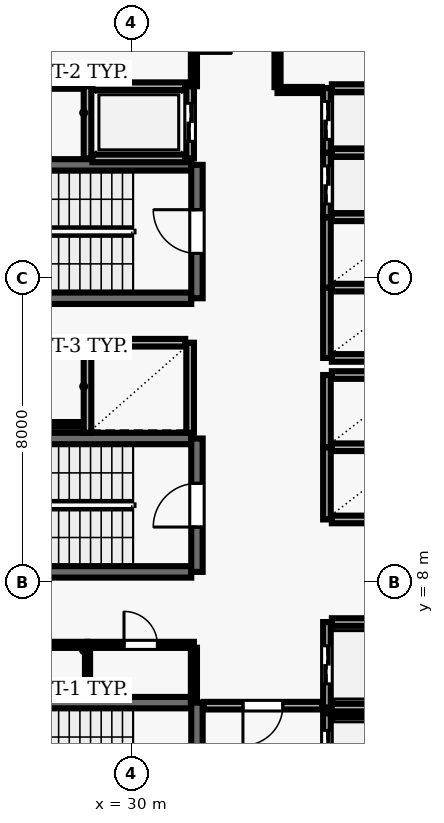
"""IFC4 building model, lengths in metres.
Left out: names, types, materials, properties, quantities, classifications, styles, units other than length and angle.
Written with IfcOpenShell. Run it as: python <this file> out.ifc"""

import sys

from ifc_helpers import new_model, si_unit, direction, frame, frame_2d, origin, place, context, subcontext, project, spatial, rectangle, extrude, element, fill, save


model = new_model("IFC4")
c1 = context("Model", 3, precision=1e-05, world=origin(), true_north=direction((0.0, 1.0)))
c2 = subcontext(c1, "Body", "Model", "MODEL_VIEW")
j1 = project(units=[si_unit("LENGTHUNIT", "METRE"), si_unit("PLANEANGLEUNIT", "RADIAN")], contexts=[c1])
p1 = place(None, origin())
s1 = spatial("IfcSite", under=j1, at=p1, CompositionType="ELEMENT")
p2 = place(p1, origin())
s2 = spatial("IfcBuilding", under=s1, at=p2, CompositionType="ELEMENT")
p3 = place(p2, frame((0.0, 0.0, 115.1)))
s3 = spatial("IfcBuildingStorey", under=s2, at=p3, CompositionType="ELEMENT", Elevation=115.1)
p4 = place(p3, frame((31.58, 4.83, 0.0), z_axis=(0.0, 0.0, 1.0), x_axis=(-1.0, 0.0, 0.0)))
e1 = element("IfcWall", 1, at=p4, inside=s3, PredefinedType="SHEAR", context=c2, shape_type="SweptSolid", body=[
    extrude(rectangle(XDim=8.36, YDim=0.3, at=frame_2d((4.18, 0.0))), origin(), (0.0, 0.0, 1.0), 3.69),
])
p5 = place(p3, frame((31.73, 0.96, 0.0), z_axis=(0.0, 0.0, 1.0), x_axis=(0.0, 1.0, 0.0)))
e2 = element("IfcWall", 2, at=p5, inside=s3, PredefinedType="SHEAR", context=c2, shape_type="SweptSolid", body=[
    extrude(rectangle(XDim=3.87, YDim=0.3, at=frame_2d((1.935, 0.0))), origin(), (0.0, 0.0, 1.0), 3.69),
])
p6 = place(p5, frame((1.54, 0.0, 0.0)))
e3 = element("IfcOpeningElement", 3, at=p6, cuts=e2, PredefinedType="OPENING", context=c2, shape_type="SweptSolid", body=[
    extrude(rectangle(XDim=1.15, YDim=2.15, at=frame_2d((0.575, 1.075))), frame((0.0, 0.16, 0.0), z_axis=(0.0, -1.0, 0.0), x_axis=(1.0, 0.0, 0.0)), (0.0, 0.0, 1.0), 0.32),
])
for number, where, z_axis, x_axis in (
    (4, (31.58, 18.98, 0.0), (0.0, 0.0, 1.0), (-1.0, 0.0, 0.0)),
    (5, (23.22, 15.47, 0.0), (0.0, 0.0, 1.0), (1.0, 0.0, 0.0)),
):
    element("IfcWall", number, at=place(p3, frame(where, z_axis=z_axis, x_axis=x_axis)), inside=s3, PredefinedType="SHEAR", context=c2, shape_type="SweptSolid", body=[
        extrude(rectangle(XDim=8.36, YDim=0.3, at=frame_2d((4.18, 0.0))), origin(), (0.0, 0.0, 1.0), 3.69),
    ])
p7 = place(p3, frame((31.73, 15.47, 0.0), z_axis=(0.0, 0.0, 1.0), x_axis=(0.0, 1.0, 0.0)))
e6 = element("IfcWall", 6, at=p7, inside=s3, PredefinedType="SHEAR", context=c2, shape_type="SweptSolid", body=[
    extrude(rectangle(XDim=3.51, YDim=0.3, at=frame_2d((1.755, 0.0))), origin(), (0.0, 0.0, 1.0), 3.69),
])
p8 = place(p7, frame((1.18, 0.0, 0.0)))
e7 = element("IfcOpeningElement", 7, at=p8, cuts=e6, PredefinedType="OPENING", context=c2, shape_type="SweptSolid", body=[
    extrude(rectangle(XDim=1.15, YDim=2.15, at=frame_2d((0.575, 1.075))), frame((0.0, 0.16, 0.0), z_axis=(0.0, -1.0, 0.0), x_axis=(1.0, 0.0, 0.0)), (0.0, 0.0, 1.0), 0.32),
])
for number, where, z_axis, x_axis in (
    (8, (31.58, 11.78, 0.0), (0.0, 0.0, 1.0), (-1.0, 0.0, 0.0)),
    (9, (23.22, 8.27, 0.0), (0.0, 0.0, 1.0), (1.0, 0.0, 0.0)),
):
    element("IfcWall", number, at=place(p3, frame(where, z_axis=z_axis, x_axis=x_axis)), inside=s3, PredefinedType="SHEAR", context=c2, shape_type="SweptSolid", body=[
        extrude(rectangle(XDim=8.36, YDim=0.3, at=frame_2d((4.18, 0.0))), origin(), (0.0, 0.0, 1.0), 3.69),
    ])
p9 = place(p3, frame((31.73, 8.27, 0.0), z_axis=(0.0, 0.0, 1.0), x_axis=(0.0, 1.0, 0.0)))
e10 = element("IfcWall", 10, at=p9, inside=s3, PredefinedType="SHEAR", context=c2, shape_type="SweptSolid", body=[
    extrude(rectangle(XDim=3.51, YDim=0.3, at=frame_2d((1.755, 0.0))), origin(), (0.0, 0.0, 1.0), 3.69),
])
p10 = place(p9, frame((1.18, 0.0, 0.0)))
e11 = element("IfcOpeningElement", 11, at=p10, cuts=e10, PredefinedType="OPENING", context=c2, shape_type="SweptSolid", body=[
    extrude(rectangle(XDim=1.15, YDim=2.15, at=frame_2d((0.575, 1.075))), frame((0.0, 0.16, 0.0), z_axis=(0.0, -1.0, 0.0), x_axis=(1.0, 0.0, 0.0)), (0.0, 0.0, 1.0), 0.32),
])
p11 = place(p3, frame((35.15, 4.55, 0.0), z_axis=(0.0, 0.0, 1.0), x_axis=(0.0, -1.0, 0.0)))
e12 = element("IfcWall", 12, at=p11, inside=s3, PredefinedType="SOLIDWALL", context=c2, shape_type="SweptSolid", body=[
    extrude(rectangle(XDim=2.1, YDim=0.2, at=frame_2d((1.05, 0.0))), origin(), (0.0, 0.0, 1.0), 3.69),
])
p12 = place(p11, frame((0.45, 0.0, 0.0)))
e13 = element("IfcOpeningElement", 13, at=p12, cuts=e12, PredefinedType="OPENING", context=c2, shape_type="SweptSolid", body=[
    extrude(rectangle(XDim=1.2, YDim=2.15, at=frame_2d((0.6, 1.075))), frame((0.0, 0.11, 0.0), z_axis=(0.0, -1.0, 0.0), x_axis=(1.0, 0.0, 0.0)), (0.0, 0.0, 1.0), 0.22),
])
p13 = place(p3, frame((37.42, 4.55, 0.0), z_axis=(0.0, 0.0, 1.0), x_axis=(-1.0, 0.0, 0.0)))
e14 = element("IfcWall", 14, at=p13, inside=s3, PredefinedType="SOLIDWALL", context=c2, shape_type="SweptSolid", body=[
    extrude(rectangle(XDim=2.14, YDim=0.2, at=frame_2d((1.07, 0.0))), origin(), (0.0, 0.0, 1.0), 3.69),
])
p14 = place(p3, frame((35.15, 6.95, 0.0), z_axis=(0.0, 0.0, 1.0), x_axis=(0.0, -1.0, 0.0)))
e15 = element("IfcWall", 15, at=p14, inside=s3, PredefinedType="SOLIDWALL", context=c2, shape_type="SweptSolid", body=[
    extrude(rectangle(XDim=2.25, YDim=0.2, at=frame_2d((1.125, 0.0))), origin(), (0.0, 0.0, 1.0), 3.69),
])
p15 = place(p14, frame((0.625, 0.0, 0.0)))
e16 = element("IfcOpeningElement", 16, at=p15, cuts=e15, PredefinedType="OPENING", context=c2, shape_type="SweptSolid", body=[
    extrude(rectangle(XDim=1.0, YDim=2.1, at=frame_2d((0.5, 1.05))), frame((0.0, 0.11, 0.0), z_axis=(0.0, -1.0, 0.0), x_axis=(1.0, 0.0, 0.0)), (0.0, 0.0, 1.0), 0.22),
])
for number, where, z_axis, x_axis in (
    (17, (35.28, 4.7, 0.0), (0.0, 0.0, 1.0), (1.0, 0.0, 0.0)),
    (18, (37.42, 6.95, 0.0), (0.0, 0.0, 1.0), (-1.0, 0.0, 0.0)),
):
    element("IfcWall", number, at=place(p3, frame(where, z_axis=z_axis, x_axis=x_axis)), inside=s3, PredefinedType="SOLIDWALL", context=c2, shape_type="SweptSolid", body=[
        extrude(rectangle(XDim=2.14, YDim=0.2, at=frame_2d((1.07, 0.0))), origin(), (0.0, 0.0, 1.0), 3.69),
    ])
p16 = place(p3, frame((35.15, 11.55, 0.0), z_axis=(0.0, 0.0, 1.0), x_axis=(0.0, -1.0, 0.0)))
e19 = element("IfcWall", 19, at=p16, inside=s3, PredefinedType="SOLIDWALL", context=c2, shape_type="SweptSolid", body=[
    extrude(rectangle(XDim=1.9, YDim=0.2, at=frame_2d((0.95, 0.0))), origin(), (0.0, 0.0, 1.0), 3.69),
])
for number, where, z_axis, x_axis in (
    (20, (35.28, 9.65, 0.0), (0.0, 0.0, 1.0), (1.0, 0.0, 0.0)),
    (21, (37.42, 11.55, 0.0), (0.0, 0.0, 1.0), (-1.0, 0.0, 0.0)),
):
    element("IfcWall", number, at=place(p3, frame(where, z_axis=z_axis, x_axis=x_axis)), inside=s3, PredefinedType="SOLIDWALL", context=c2, shape_type="SweptSolid", body=[
        extrude(rectangle(XDim=2.14, YDim=0.2, at=frame_2d((1.07, 0.0))), origin(), (0.0, 0.0, 1.0), 3.69),
    ])
p17 = place(p3, frame((35.15, 13.45, 0.0), z_axis=(0.0, 0.0, 1.0), x_axis=(0.0, -1.0, 0.0)))
e22 = element("IfcWall", 22, at=p17, inside=s3, PredefinedType="SOLIDWALL", context=c2, shape_type="SweptSolid", body=[
    extrude(rectangle(XDim=1.9, YDim=0.2, at=frame_2d((0.95, 0.0))), origin(), (0.0, 0.0, 1.0), 3.69),
])
p18 = place(p3, frame((37.42, 13.45, 0.0), z_axis=(0.0, 0.0, 1.0), x_axis=(-1.0, 0.0, 0.0)))
e23 = element("IfcWall", 23, at=p18, inside=s3, PredefinedType="SOLIDWALL", context=c2, shape_type="SweptSolid", body=[
    extrude(rectangle(XDim=2.14, YDim=0.2, at=frame_2d((1.07, 0.0))), origin(), (0.0, 0.0, 1.0), 3.69),
])
for number, where, z_axis, x_axis in (
    (24, (28.85, 14.3, 0.0), (0.0, 0.0, 1.0), (0.0, -1.0, 0.0)),
    (25, (31.55, 11.93, 0.0), (0.0, 0.0, 1.0), (0.0, 1.0, 0.0)),
):
    element("IfcWall", number, at=place(p3, frame(where, z_axis=z_axis, x_axis=x_axis)), inside=s3, PredefinedType="SOLIDWALL", context=c2, shape_type="SweptSolid", body=[
        extrude(rectangle(XDim=2.37, YDim=0.2, at=frame_2d((1.185, 0.0))), origin(), (0.0, 0.0, 1.0), 3.69),
    ])
p19 = place(p3, frame((31.42, 14.3, 0.0), z_axis=(0.0, 0.0, 1.0), x_axis=(-1.0, 0.0, 0.0)))
e26 = element("IfcWall", 26, at=p19, inside=s3, PredefinedType="SOLIDWALL", context=c2, shape_type="SweptSolid", body=[
    extrude(rectangle(XDim=2.44, YDim=0.2, at=frame_2d((1.22, 0.0))), origin(), (0.0, 0.0, 1.0), 3.69),
])
p20 = place(p3, frame((35.15, 15.75, 0.0), z_axis=(0.0, 0.0, 1.0), x_axis=(0.0, -1.0, 0.0)))
e27 = element("IfcWall", 27, at=p20, inside=s3, PredefinedType="SOLIDWALL", context=c2, shape_type="SweptSolid", body=[
    extrude(rectangle(XDim=1.85, YDim=0.2, at=frame_2d((0.925, 0.0))), origin(), (0.0, 0.0, 1.0), 3.69),
])
for number, where, z_axis, x_axis in (
    (28, (35.28, 13.9, 0.0), (0.0, 0.0, 1.0), (1.0, 0.0, 0.0)),
    (29, (37.42, 15.75, 0.0), (0.0, 0.0, 1.0), (-1.0, 0.0, 0.0)),
):
    element("IfcWall", number, at=place(p3, frame(where, z_axis=z_axis, x_axis=x_axis)), inside=s3, PredefinedType="SOLIDWALL", context=c2, shape_type="SweptSolid", body=[
        extrude(rectangle(XDim=2.14, YDim=0.2, at=frame_2d((1.07, 0.0))), origin(), (0.0, 0.0, 1.0), 3.69),
    ])
p21 = place(p3, frame((35.15, 17.6, 0.0), z_axis=(0.0, 0.0, 1.0), x_axis=(0.0, -1.0, 0.0)))
e30 = element("IfcWall", 30, at=p21, inside=s3, PredefinedType="SOLIDWALL", context=c2, shape_type="SweptSolid", body=[
    extrude(rectangle(XDim=1.85, YDim=0.2, at=frame_2d((0.925, 0.0))), origin(), (0.0, 0.0, 1.0), 3.69),
])
p22 = place(p3, frame((37.42, 17.6, 0.0), z_axis=(0.0, 0.0, 1.0), x_axis=(-1.0, 0.0, 0.0)))
e31 = element("IfcWall", 31, at=p22, inside=s3, PredefinedType="SOLIDWALL", context=c2, shape_type="SweptSolid", body=[
    extrude(rectangle(XDim=2.14, YDim=0.2, at=frame_2d((1.07, 0.0))), origin(), (0.0, 0.0, 1.0), 3.69),
])
p23 = place(p3, frame((35.15, 19.3, 0.0), z_axis=(0.0, 0.0, 1.0), x_axis=(0.0, -1.0, 0.0)))
e32 = element("IfcWall", 32, at=p23, inside=s3, PredefinedType="SOLIDWALL", context=c2, shape_type="SweptSolid", body=[
    extrude(rectangle(XDim=1.7, YDim=0.2, at=frame_2d((0.85, 0.0))), origin(), (0.0, 0.0, 1.0), 3.69),
])
p24 = place(p23, frame((0.35, 0.0, 0.0)))
e33 = element("IfcOpeningElement", 33, at=p24, cuts=e32, PredefinedType="OPENING", context=c2, shape_type="SweptSolid", body=[
    extrude(rectangle(XDim=1.0, YDim=2.1, at=frame_2d((0.5, 1.05))), frame((0.0, 0.11, 0.0), z_axis=(0.0, -1.0, 0.0), x_axis=(1.0, 0.0, 0.0)), (0.0, 0.0, 1.0), 0.22),
])
p25 = place(p3, frame((37.42, 19.3, 0.0), z_axis=(0.0, 0.0, 1.0), x_axis=(-1.0, 0.0, 0.0)))
e34 = element("IfcWall", 34, at=p25, inside=s3, PredefinedType="SOLIDWALL", context=c2, shape_type="SweptSolid", body=[
    extrude(rectangle(XDim=2.14, YDim=0.2, at=frame_2d((1.07, 0.0))), origin(), (0.0, 0.0, 1.0), 3.69),
])
p26 = place(p3, frame((35.15, 21.0, 0.0), z_axis=(0.0, 0.0, 1.0), x_axis=(0.0, -1.0, 0.0)))
e35 = element("IfcWall", 35, at=p26, inside=s3, PredefinedType="SOLIDWALL", context=c2, shape_type="SweptSolid", body=[
    extrude(rectangle(XDim=1.7, YDim=0.2, at=frame_2d((0.85, 0.0))), origin(), (0.0, 0.0, 1.0), 3.69),
])
p27 = place(p26, frame((0.35, 0.0, 0.0)))
e36 = element("IfcOpeningElement", 36, at=p27, cuts=e35, PredefinedType="OPENING", context=c2, shape_type="SweptSolid", body=[
    extrude(rectangle(XDim=1.0, YDim=2.1, at=frame_2d((0.5, 1.05))), frame((0.0, 0.11, 0.0), z_axis=(0.0, -1.0, 0.0), x_axis=(1.0, 0.0, 0.0)), (0.0, 0.0, 1.0), 0.22),
])
p28 = place(p3, frame((37.42, 21.0, 0.0), z_axis=(0.0, 0.0, 1.0), x_axis=(-1.0, 0.0, 0.0)))
e37 = element("IfcWall", 37, at=p28, inside=s3, PredefinedType="SOLIDWALL", context=c2, shape_type="SweptSolid", body=[
    extrude(rectangle(XDim=2.14, YDim=0.2, at=frame_2d((1.07, 0.0))), origin(), (0.0, 0.0, 1.0), 3.69),
])
p29 = place(p3, frame((28.85, 21.05, 0.0), z_axis=(0.0, 0.0, 1.0), x_axis=(0.0, -1.0, 0.0)))
e38 = element("IfcWall", 38, at=p29, inside=s3, PredefinedType="SOLIDWALL", context=c2, shape_type="SweptSolid", body=[
    extrude(rectangle(XDim=1.9, YDim=0.2, at=frame_2d((0.95, 0.0))), origin(), (0.0, 0.0, 1.0), 3.69),
])
p30 = place(p3, frame((31.55, 19.15, 0.0), z_axis=(0.0, 0.0, 1.0), x_axis=(0.0, 1.0, 0.0)))
e39 = element("IfcWall", 39, at=p30, inside=s3, PredefinedType="SOLIDWALL", context=c2, shape_type="SweptSolid", body=[
    extrude(rectangle(XDim=1.9, YDim=0.2, at=frame_2d((0.95, 0.0))), origin(), (0.0, 0.0, 1.0), 3.69),
])
p31 = place(p30, frame((0.45, 0.0, 0.0)))
e40 = element("IfcOpeningElement", 40, at=p31, cuts=e39, PredefinedType="OPENING", context=c2, shape_type="SweptSolid", body=[
    extrude(rectangle(XDim=1.0, YDim=2.1, at=frame_2d((0.5, 1.05))), frame((0.0, 0.11, 0.0), z_axis=(0.0, -1.0, 0.0), x_axis=(1.0, 0.0, 0.0)), (0.0, 0.0, 1.0), 0.22),
])
for number, where, z_axis, x_axis in (
    (41, (28.98, 19.15, 0.0), (0.0, 0.0, 1.0), (1.0, 0.0, 0.0)),
    (42, (31.42, 21.05, 0.0), (0.0, 0.0, 1.0), (-1.0, 0.0, 0.0)),
):
    element("IfcWall", number, at=place(p3, frame(where, z_axis=z_axis, x_axis=x_axis)), inside=s3, PredefinedType="SOLIDWALL", context=c2, shape_type="SweptSolid", body=[
        extrude(rectangle(XDim=2.44, YDim=0.2, at=frame_2d((1.22, 0.0))), origin(), (0.0, 0.0, 1.0), 3.69),
    ])
p32 = place(p3, frame((24.35, 12.15, 0.0), z_axis=(0.0, 0.0, 1.0), x_axis=(1.0, 0.0, 0.0)))
e43 = element("IfcWall", 43, at=p32, inside=s3, PredefinedType="PARTITIONING", context=c2, shape_type="SweptSolid", body=[
    extrude(rectangle(XDim=4.37, YDim=0.125, at=frame_2d((2.185, 0.0))), origin(), (0.0, 0.0, 1.0), 3.69),
])
p33 = place(p3, frame((24.35, 14.3, 0.0), z_axis=(0.0, 0.0, 1.0), x_axis=(1.0, 0.0, 0.0)))
e44 = element("IfcWall", 44, at=p33, inside=s3, PredefinedType="PARTITIONING", context=c2, shape_type="SweptSolid", body=[
    extrude(rectangle(XDim=4.37, YDim=0.16, at=frame_2d((2.185, 0.0))), origin(), (0.0, 0.0, 1.0), 3.69),
])
p34 = place(p33, frame((1.735, 0.0, 0.0)))
e45 = element("IfcOpeningElement", 45, at=p34, cuts=e44, PredefinedType="OPENING", context=c2, shape_type="SweptSolid", body=[
    extrude(rectangle(XDim=0.9, YDim=2.1, at=frame_2d((0.45, 1.05))), frame((0.0, 0.09, 0.0), z_axis=(0.0, -1.0, 0.0), x_axis=(1.0, 0.0, 0.0)), (0.0, 0.0, 1.0), 0.18),
])
p35 = place(p3, frame((26.0, 6.35, 0.0), z_axis=(0.0, 0.0, 1.0), x_axis=(1.0, 0.0, 0.0)))
e46 = element("IfcWall", 46, at=p35, inside=s3, PredefinedType="PARTITIONING", context=c2, shape_type="SweptSolid", body=[
    extrude(rectangle(XDim=2.85, YDim=0.16, at=frame_2d((1.425, 0.0))), origin(), (0.0, 0.0, 1.0), 3.69),
])
p36 = place(p35, frame((0.985, 0.0, 0.0)))
e47 = element("IfcOpeningElement", 47, at=p36, cuts=e46, PredefinedType="OPENING", context=c2, shape_type="SweptSolid", body=[
    extrude(rectangle(XDim=0.88, YDim=2.1, at=frame_2d((0.44, 1.05))), frame((0.0, 0.09, 0.0), z_axis=(0.0, -1.0, 0.0), x_axis=(1.0, 0.0, 0.0)), (0.0, 0.0, 1.0), 0.18),
])
p37 = place(p3, frame((26.2, 21.05, 0.0), z_axis=(0.0, 0.0, 1.0), x_axis=(1.0, 0.0, 0.0)))
e48 = element("IfcWall", 48, at=p37, inside=s3, PredefinedType="PARTITIONING", context=c2, shape_type="SweptSolid", body=[
    extrude(rectangle(XDim=2.52, YDim=0.135, at=frame_2d((1.26, 0.0))), origin(), (0.0, 0.0, 1.0), 3.69),
])
p38 = place(p3, frame((28.85, 6.35, 0.0), z_axis=(0.0, 0.0, 1.0), x_axis=(1.0, 0.0, 0.0)))
e49 = element("IfcWall", 49, at=p38, inside=s3, PredefinedType="PARTITIONING", context=c2, shape_type="SweptSolid", body=[
    extrude(rectangle(XDim=2.8, YDim=0.16, at=frame_2d((1.4, 0.0))), origin(), (0.0, 0.0, 1.0), 3.69),
])
p39 = place(p38, frame((0.96, 0.0, 0.0)))
e50 = element("IfcOpeningElement", 50, at=p39, cuts=e49, PredefinedType="OPENING", context=c2, shape_type="SweptSolid", body=[
    extrude(rectangle(XDim=0.88, YDim=2.1, at=frame_2d((0.44, 1.05))), frame((0.0, 0.09, 0.0), z_axis=(0.0, -1.0, 0.0), x_axis=(1.0, 0.0, 0.0)), (0.0, 0.0, 1.0), 0.18),
])
p40 = place(p3, frame((35.02, 4.75, 0.0), z_axis=(0.0, 0.0, 1.0), x_axis=(-1.0, 0.0, 0.0)))
e51 = element("IfcWall", 51, at=p40, inside=s3, PredefinedType="SOLIDWALL", context=c2, shape_type="SweptSolid", body=[
    extrude(rectangle(XDim=3.11, YDim=0.2, at=frame_2d((1.555, 0.0))), origin(), (0.0, 0.0, 1.0), 3.69),
])
p41 = place(p40, frame((1.03, 0.0, 0.0)))
e52 = element("IfcOpeningElement", 52, at=p41, cuts=e51, PredefinedType="OPENING", context=c2, shape_type="SweptSolid", body=[
    extrude(rectangle(XDim=1.05, YDim=2.15, at=frame_2d((0.525, 1.075))), frame((0.0, 0.11, 0.0), z_axis=(0.0, -1.0, 0.0), x_axis=(1.0, 0.0, 0.0)), (0.0, 0.0, 1.0), 0.22),
])
p42 = place(p3, frame((35.02, 20.95, 0.0), z_axis=(0.0, 0.0, 1.0), x_axis=(-1.0, 0.0, 0.0)))
e53 = element("IfcWall", 53, at=p42, inside=s3, PredefinedType="PARTITIONING", context=c2, shape_type="SweptSolid", body=[
    extrude(rectangle(XDim=1.17, YDim=0.16, at=frame_2d((0.585, 0.0))), origin(), (0.0, 0.0, 1.0), 3.69),
])
p43 = place(p3, frame((28.85, 5.01, 0.0), z_axis=(0.0, 0.0, 1.0), x_axis=(0.0, 1.0, 0.0)))
e54 = element("IfcWall", 54, at=p43, inside=s3, PredefinedType="PARTITIONING", context=c2, shape_type="SweptSolid", body=[
    extrude(rectangle(XDim=1.265, YDim=0.135, at=frame_2d((0.632, 0.0))), origin(), (0.0, 0.0, 1.0), 3.69),
])
p44 = place(p3, frame((31.65, 4.86, 0.0), z_axis=(0.0, 0.0, 1.0), x_axis=(0.0, 1.0, 0.0)))
e55 = element("IfcWall", 55, at=p44, inside=s3, PredefinedType="PARTITIONING", context=c2, shape_type="SweptSolid", body=[
    extrude(rectangle(XDim=1.415, YDim=0.16, at=frame_2d((0.708, 0.0))), origin(), (0.0, 0.0, 1.0), 3.69),
])
p45 = place(p3, frame((31.65, 23.775, 0.0), z_axis=(0.0, 0.0, 1.0), x_axis=(0.0, -1.0, 0.0)))
e56 = element("IfcWall", 56, at=p45, inside=s3, PredefinedType="PARTITIONING", context=c2, shape_type="SweptSolid", body=[
    extrude(rectangle(XDim=2.725, YDim=0.16, at=frame_2d((1.362, 0.0))), origin(), (0.0, 0.0, 1.0), 3.69),
])
p46 = place(p45, frame((0.862, 0.0, 0.0)))
e57 = element("IfcOpeningElement", 57, at=p46, cuts=e56, PredefinedType="OPENING", context=c2, shape_type="SweptSolid", body=[
    extrude(rectangle(XDim=1.0, YDim=2.1, at=frame_2d((0.5, 1.05))), frame((0.0, 0.09, 0.0), z_axis=(0.0, -1.0, 0.0), x_axis=(1.0, 0.0, 0.0)), (0.0, 0.0, 1.0), 0.18),
])
p47 = place(p3, frame((33.85, 21.025, 0.0), z_axis=(0.0, 0.0, 1.0), x_axis=(0.0, 1.0, 0.0)))
e58 = element("IfcWall", 58, at=p47, inside=s3, PredefinedType="PARTITIONING", context=c2, shape_type="SweptSolid", body=[
    extrude(rectangle(XDim=2.75, YDim=0.16, at=frame_2d((1.375, 0.0))), origin(), (0.0, 0.0, 1.0), 3.69),
])
p48 = place(p8, origin())
e59 = element("IfcDoor", 59, at=p48, inside=s3, OperationType="SINGLE_SWING_RIGHT", PredefinedType="DOOR", context=c2, shape_type="SweptSolid", body=[
    extrude(rectangle(XDim=1.15, YDim=2.15, at=frame_2d((0.575, 1.075))), frame((0.0, 0.025, 0.0), z_axis=(0.0, -1.0, 0.0), x_axis=(1.0, 0.0, 0.0)), (0.0, 0.0, 1.0), 0.05),
])
fill(e7, e59)
p49 = place(p10, origin())
e60 = element("IfcDoor", 60, at=p49, inside=s3, OperationType="SINGLE_SWING_LEFT", PredefinedType="DOOR", context=c2, shape_type="SweptSolid", body=[
    extrude(rectangle(XDim=1.15, YDim=2.15, at=frame_2d((0.575, 1.075))), frame((0.0, 0.025, 0.0), z_axis=(0.0, -1.0, 0.0), x_axis=(1.0, 0.0, 0.0)), (0.0, 0.0, 1.0), 0.05),
])
fill(e11, e60)
p50 = place(p12, origin())
e61 = element("IfcDoor", 61, at=p50, inside=s3, OperationType="DOUBLE_DOOR_SLIDING", PredefinedType="DOOR", context=c2, shape_type="SweptSolid", body=[
    extrude(rectangle(XDim=1.2, YDim=2.15, at=frame_2d((0.6, 1.075))), frame((0.0, 0.025, 0.0), z_axis=(0.0, -1.0, 0.0), x_axis=(1.0, 0.0, 0.0)), (0.0, 0.0, 1.0), 0.05),
])
fill(e13, e61)
p51 = place(p15, origin())
e62 = element("IfcDoor", 62, at=p51, inside=s3, OperationType="DOUBLE_DOOR_SLIDING", PredefinedType="DOOR", context=c2, shape_type="SweptSolid", body=[
    extrude(rectangle(XDim=1.0, YDim=2.1, at=frame_2d((0.5, 1.05))), frame((0.0, 0.025, 0.0), z_axis=(0.0, -1.0, 0.0), x_axis=(1.0, 0.0, 0.0)), (0.0, 0.0, 1.0), 0.05),
])
fill(e16, e62)
p52 = place(p24, origin())
e63 = element("IfcDoor", 63, at=p52, inside=s3, OperationType="DOUBLE_DOOR_SLIDING", PredefinedType="DOOR", context=c2, shape_type="SweptSolid", body=[
    extrude(rectangle(XDim=1.0, YDim=2.1, at=frame_2d((0.5, 1.05))), frame((0.0, 0.025, 0.0), z_axis=(0.0, -1.0, 0.0), x_axis=(1.0, 0.0, 0.0)), (0.0, 0.0, 1.0), 0.05),
])
fill(e33, e63)
p53 = place(p27, origin())
e64 = element("IfcDoor", 64, at=p53, inside=s3, OperationType="DOUBLE_DOOR_SLIDING", PredefinedType="DOOR", context=c2, shape_type="SweptSolid", body=[
    extrude(rectangle(XDim=1.0, YDim=2.1, at=frame_2d((0.5, 1.05))), frame((0.0, 0.025, 0.0), z_axis=(0.0, -1.0, 0.0), x_axis=(1.0, 0.0, 0.0)), (0.0, 0.0, 1.0), 0.05),
])
fill(e36, e64)
p54 = place(p31, origin())
e65 = element("IfcDoor", 65, at=p54, inside=s3, OperationType="DOUBLE_DOOR_SLIDING", PredefinedType="DOOR", context=c2, shape_type="SweptSolid", body=[
    extrude(rectangle(XDim=1.0, YDim=2.1, at=frame_2d((0.5, 1.05))), frame((0.0, 0.025, 0.0), z_axis=(0.0, -1.0, 0.0), x_axis=(1.0, 0.0, 0.0)), (0.0, 0.0, 1.0), 0.05),
])
fill(e40, e65)
p55 = place(p41, origin())
e66 = element("IfcDoor", 66, at=p55, inside=s3, OperationType="SINGLE_SWING_RIGHT", PredefinedType="DOOR", context=c2, shape_type="SweptSolid", body=[
    extrude(rectangle(XDim=1.05, YDim=2.15, at=frame_2d((0.525, 1.075))), frame((0.0, 0.025, 0.0), z_axis=(0.0, -1.0, 0.0), x_axis=(1.0, 0.0, 0.0)), (0.0, 0.0, 1.0), 0.05),
])
fill(e52, e66)
p56 = place(p46, origin())
e67 = element("IfcDoor", 67, at=p56, inside=s3, OperationType="SINGLE_SWING_RIGHT", PredefinedType="DOOR", context=c2, shape_type="SweptSolid", body=[
    extrude(rectangle(XDim=1.0, YDim=2.1, at=frame_2d((0.5, 1.05))), frame((0.0, 0.025, 0.0), z_axis=(0.0, -1.0, 0.0), x_axis=(1.0, 0.0, 0.0)), (0.0, 0.0, 1.0), 0.05),
])
fill(e57, e67)
p57 = place(p39, origin())
e68 = element("IfcDoor", 68, at=p57, inside=s3, OperationType="SINGLE_SWING_LEFT", PredefinedType="DOOR", context=c2, shape_type="SweptSolid", body=[
    extrude(rectangle(XDim=0.88, YDim=2.1, at=frame_2d((0.44, 1.05))), frame((0.0, 0.025, 0.0), z_axis=(0.0, -1.0, 0.0), x_axis=(1.0, 0.0, 0.0)), (0.0, 0.0, 1.0), 0.05),
])
fill(e50, e68)
save(model, sys.argv[1])
